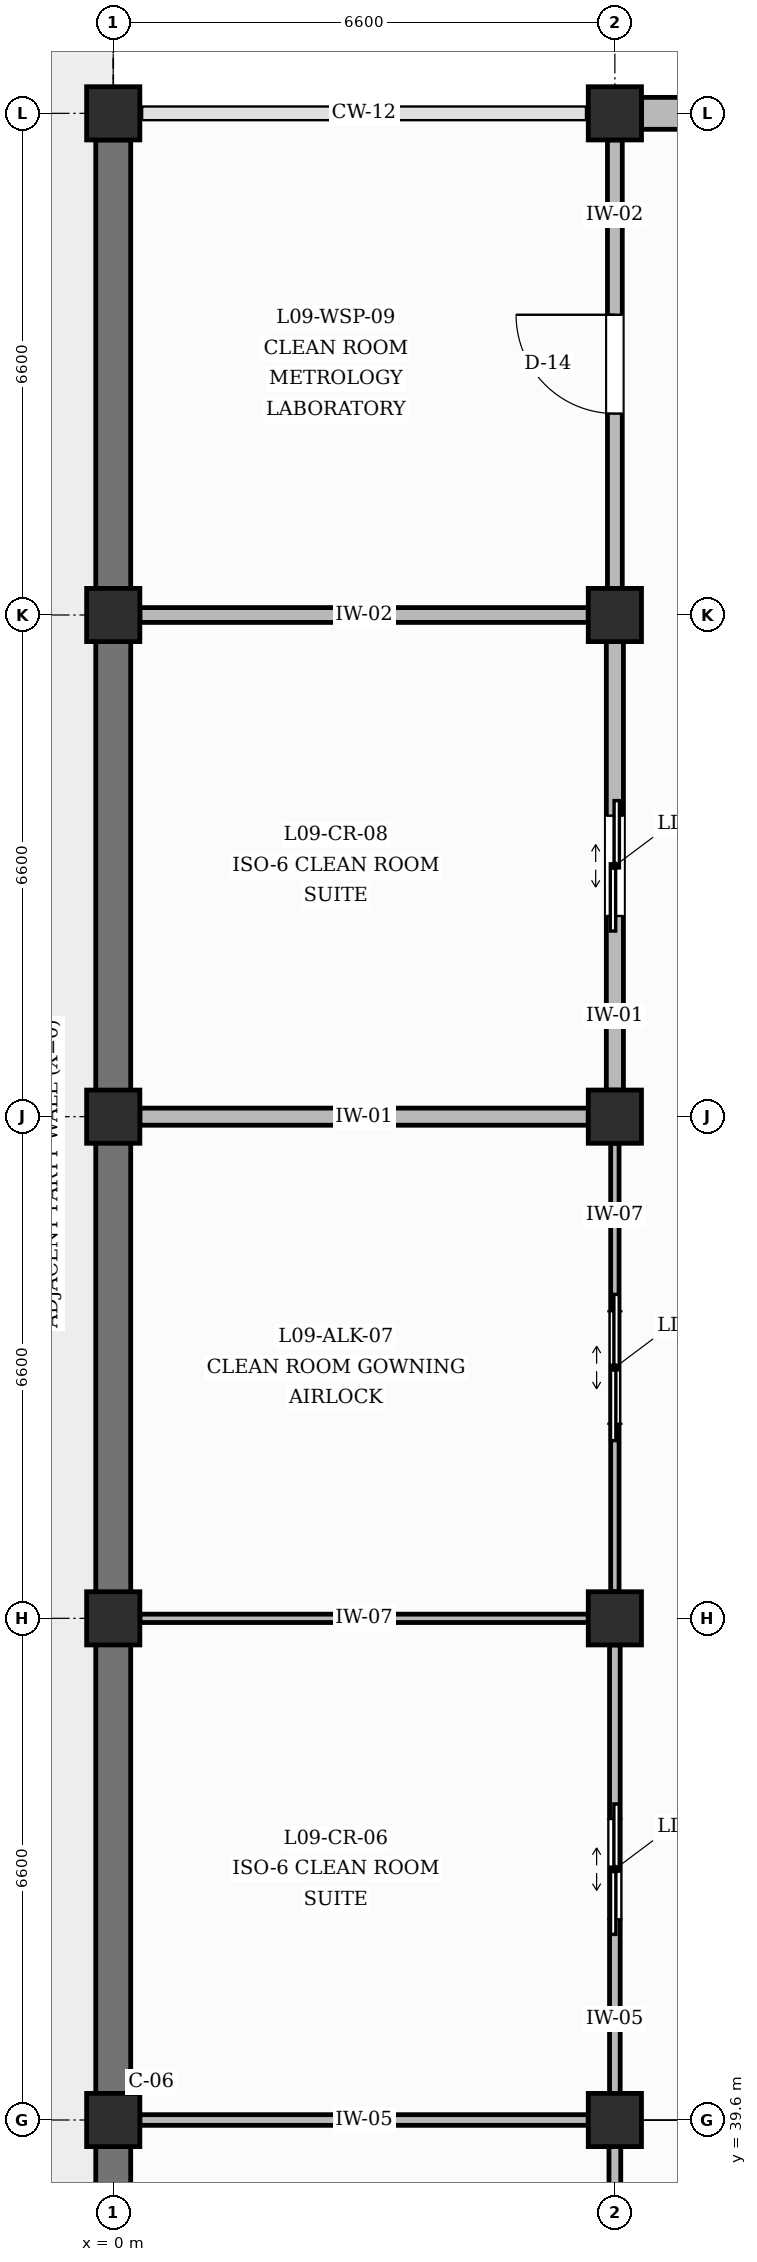
"""IFC4 building model, lengths in metres.
Left out: names, types, materials, properties, quantities, classifications, styles, units other than length and angle.
Written with IfcOpenShell. Run it as: python <this file> out.ifc"""

import sys

from ifc_helpers import new_model, si_unit, direction, frame, frame_2d, origin, origin_2d, place, context, subcontext, project, spatial, rectangle, extrude, element, fill, save


model = new_model("IFC4")
c1 = context("Model", 3, precision=1e-05, world=origin(), true_north=direction((0.0, 1.0)))
c2 = subcontext(c1, "Body", "Model", "MODEL_VIEW")
j1 = project(units=[si_unit("LENGTHUNIT", "METRE"), si_unit("PLANEANGLEUNIT", "RADIAN")], contexts=[c1])
p1 = place(None, origin())
s1 = spatial("IfcSite", under=j1, at=p1, CompositionType="ELEMENT")
p2 = place(p1, origin())
s2 = spatial("IfcBuilding", under=s1, at=p2, CompositionType="ELEMENT")
p3 = place(p2, frame((0.0, 0.0, 39.6)))
s3 = spatial("IfcBuildingStorey", under=s2, at=p3, CompositionType="ELEMENT", Elevation=39.6)
for number, where, z_axis, x_axis in (
    (1, (0.0, 39.6, 0.0), (0.0, 0.0, 1.0), (1.0, 0.0, 0.0)),
    (2, (0.0, 46.2, 0.0), (0.0, 0.0, 1.0), (1.0, 0.0, 0.0)),
    (3, (0.0, 52.8, 0.0), (0.0, 0.0, 1.0), (1.0, 0.0, 0.0)),
    (4, (0.0, 59.4, 0.0), (0.0, 0.0, 1.0), (1.0, 0.0, 0.0)),
    (5, (0.0, 66.0, 0.0), (0.0, 0.0, 1.0), (1.0, 0.0, 0.0)),
    (6, (6.6, 39.6, 0.0), (0.0, 0.0, 1.0), (1.0, 0.0, 0.0)),
    (7, (6.6, 46.2, 0.0), (0.0, 0.0, 1.0), (1.0, 0.0, 0.0)),
    (8, (6.6, 52.8, 0.0), (0.0, 0.0, 1.0), (1.0, 0.0, 0.0)),
    (9, (6.6, 59.4, 0.0), (0.0, 0.0, 1.0), (1.0, 0.0, 0.0)),
    (10, (6.6, 66.0, 0.0), (0.0, 0.0, 1.0), (1.0, 0.0, 0.0)),
):
    element("IfcColumn", number, at=place(p3, frame(where, z_axis=z_axis, x_axis=x_axis)), inside=s3, PredefinedType="COLUMN", context=c2, shape_type="SweptSolid", body=[
        extrude(rectangle(XDim=0.7, YDim=0.7, at=origin_2d()), origin(), (0.0, 0.0, 1.0), 4.2),
    ])
p4 = place(p3, frame((0.0, 33.35, 0.0), z_axis=(0.0, 0.0, 1.0), x_axis=(0.0, 1.0, 0.0)))
e11 = element("IfcWall", 11, at=p4, inside=s3, PredefinedType="SOLIDWALL", context=c2, shape_type="SweptSolid", body=[
    extrude(rectangle(XDim=5.9, YDim=0.46, at=frame_2d((2.95, 0.0))), origin(), (0.0, 0.0, 1.0), 3.29),
])
p5 = place(p3, frame((0.0, 39.95, 0.0), z_axis=(0.0, 0.0, 1.0), x_axis=(0.0, 1.0, 0.0)))
e12 = element("IfcWall", 12, at=p5, inside=s3, PredefinedType="SOLIDWALL", context=c2, shape_type="SweptSolid", body=[
    extrude(rectangle(XDim=5.9, YDim=0.46, at=frame_2d((2.95, 0.0))), origin(), (0.0, 0.0, 1.0), 3.29),
])
p6 = place(p3, frame((0.0, 46.55, 0.0), z_axis=(0.0, 0.0, 1.0), x_axis=(0.0, 1.0, 0.0)))
e13 = element("IfcWall", 13, at=p6, inside=s3, PredefinedType="SOLIDWALL", context=c2, shape_type="SweptSolid", body=[
    extrude(rectangle(XDim=5.9, YDim=0.46, at=frame_2d((2.95, 0.0))), origin(), (0.0, 0.0, 1.0), 3.29),
])
p7 = place(p3, frame((0.0, 53.15, 0.0), z_axis=(0.0, 0.0, 1.0), x_axis=(0.0, 1.0, 0.0)))
e14 = element("IfcWall", 14, at=p7, inside=s3, PredefinedType="SOLIDWALL", context=c2, shape_type="SweptSolid", body=[
    extrude(rectangle(XDim=5.9, YDim=0.46, at=frame_2d((2.95, 0.0))), origin(), (0.0, 0.0, 1.0), 3.29),
])
p8 = place(p3, frame((0.0, 59.75, 0.0), z_axis=(0.0, 0.0, 1.0), x_axis=(0.0, 1.0, 0.0)))
e15 = element("IfcWall", 15, at=p8, inside=s3, PredefinedType="SOLIDWALL", context=c2, shape_type="SweptSolid", body=[
    extrude(rectangle(XDim=5.9, YDim=0.46, at=frame_2d((2.95, 0.0))), origin(), (0.0, 0.0, 1.0), 3.29),
])
p9 = place(p3, frame((6.95, 66.0, 0.0), z_axis=(0.0, 0.0, 1.0), x_axis=(1.0, 0.0, 0.0)))
e16 = element("IfcWall", 16, at=p9, inside=s3, PredefinedType="SOLIDWALL", context=c2, shape_type="SweptSolid", body=[
    extrude(rectangle(XDim=5.9, YDim=0.42, at=frame_2d((2.95, 0.0))), origin(), (0.0, 0.0, 1.0), 3.29),
])
p10 = place(p9, frame((0.8, 0.0, 0.95)))
e17 = element("IfcOpeningElement", 17, at=p10, cuts=e16, PredefinedType="OPENING", context=c2, shape_type="SweptSolid", body=[
    extrude(rectangle(XDim=1.34, YDim=1.52, at=frame_2d((0.67, 0.76))), frame((0.0, 0.22, 0.0), z_axis=(0.0, -1.0, 0.0), x_axis=(1.0, 0.0, 0.0)), (0.0, 0.0, 1.0), 0.44),
])
p11 = place(p9, frame((3.76, 0.0, 0.95)))
e18 = element("IfcOpeningElement", 18, at=p11, cuts=e16, PredefinedType="OPENING", context=c2, shape_type="SweptSolid", body=[
    extrude(rectangle(XDim=1.34, YDim=1.52, at=frame_2d((0.67, 0.76))), frame((0.0, 0.22, 0.0), z_axis=(0.0, -1.0, 0.0), x_axis=(1.0, 0.0, 0.0)), (0.0, 0.0, 1.0), 0.44),
])
p12 = place(p3, frame((6.6, 33.35, 0.0), z_axis=(0.0, 0.0, 1.0), x_axis=(0.0, 1.0, 0.0)))
e19 = element("IfcWall", 19, at=p12, inside=s3, PredefinedType="PARTITIONING", context=c2, shape_type="SweptSolid", body=[
    extrude(rectangle(XDim=5.9, YDim=0.155, at=frame_2d((2.95, 0.0))), origin(), (0.0, 0.0, 1.0), 3.29),
])
p13 = place(p12, frame((2.21, 0.0, 0.0)))
e20 = element("IfcOpeningElement", 20, at=p13, cuts=e19, PredefinedType="OPENING", context=c2, shape_type="SweptSolid", body=[
    extrude(rectangle(XDim=1.48, YDim=2.25, at=frame_2d((0.74, 1.125))), frame((0.0, 0.087, 0.0), z_axis=(0.0, -1.0, 0.0), x_axis=(1.0, 0.0, 0.0)), (0.0, 0.0, 1.0), 0.175),
])
p14 = place(p3, frame((0.35, 39.6, 0.0), z_axis=(0.0, 0.0, 1.0), x_axis=(1.0, 0.0, 0.0)))
e21 = element("IfcWall", 21, at=p14, inside=s3, PredefinedType="PARTITIONING", context=c2, shape_type="SweptSolid", body=[
    extrude(rectangle(XDim=5.9, YDim=0.14, at=frame_2d((2.95, 0.0))), origin(), (0.0, 0.0, 1.0), 3.29),
])
p15 = place(p3, frame((6.6, 39.95, 0.0), z_axis=(0.0, 0.0, 1.0), x_axis=(0.0, 1.0, 0.0)))
e22 = element("IfcWall", 22, at=p15, inside=s3, PredefinedType="PARTITIONING", context=c2, shape_type="SweptSolid", body=[
    extrude(rectangle(XDim=5.9, YDim=0.14, at=frame_2d((2.95, 0.0))), origin(), (0.0, 0.0, 1.0), 3.29),
])
p16 = place(p15, frame((2.29, 0.0, 0.0)))
e23 = element("IfcOpeningElement", 23, at=p16, cuts=e22, PredefinedType="OPENING", context=c2, shape_type="SweptSolid", body=[
    extrude(rectangle(XDim=1.32, YDim=2.2, at=frame_2d((0.66, 1.1))), frame((0.0, 0.08, 0.0), z_axis=(0.0, -1.0, 0.0), x_axis=(1.0, 0.0, 0.0)), (0.0, 0.0, 1.0), 0.16),
])
p17 = place(p3, frame((0.35, 46.2, 0.0), z_axis=(0.0, 0.0, 1.0), x_axis=(1.0, 0.0, 0.0)))
e24 = element("IfcWall", 24, at=p17, inside=s3, PredefinedType="PARTITIONING", context=c2, shape_type="SweptSolid", body=[
    extrude(rectangle(XDim=5.9, YDim=0.11, at=frame_2d((2.95, 0.0))), origin(), (0.0, 0.0, 1.0), 3.29),
])
p18 = place(p3, frame((6.6, 46.55, 0.0), z_axis=(0.0, 0.0, 1.0), x_axis=(0.0, 1.0, 0.0)))
e25 = element("IfcWall", 25, at=p18, inside=s3, PredefinedType="PARTITIONING", context=c2, shape_type="SweptSolid", body=[
    extrude(rectangle(XDim=5.9, YDim=0.11, at=frame_2d((2.95, 0.0))), origin(), (0.0, 0.0, 1.0), 3.29),
])
p19 = place(p18, frame((2.21, 0.0, 0.0)))
e26 = element("IfcOpeningElement", 26, at=p19, cuts=e25, PredefinedType="OPENING", context=c2, shape_type="SweptSolid", body=[
    extrude(rectangle(XDim=1.48, YDim=2.25, at=frame_2d((0.74, 1.125))), frame((0.0, 0.065, 0.0), z_axis=(0.0, -1.0, 0.0), x_axis=(1.0, 0.0, 0.0)), (0.0, 0.0, 1.0), 0.13),
])
p20 = place(p3, frame((0.35, 52.8, 0.0), z_axis=(0.0, 0.0, 1.0), x_axis=(1.0, 0.0, 0.0)))
e27 = element("IfcWall", 27, at=p20, inside=s3, PredefinedType="PARTITIONING", context=c2, shape_type="SweptSolid", body=[
    extrude(rectangle(XDim=5.9, YDim=0.225, at=frame_2d((2.95, 0.0))), origin(), (0.0, 0.0, 1.0), 3.29),
])
p21 = place(p3, frame((6.6, 53.15, 0.0), z_axis=(0.0, 0.0, 1.0), x_axis=(0.0, 1.0, 0.0)))
e28 = element("IfcWall", 28, at=p21, inside=s3, PredefinedType="PARTITIONING", context=c2, shape_type="SweptSolid", body=[
    extrude(rectangle(XDim=5.9, YDim=0.225, at=frame_2d((2.95, 0.0))), origin(), (0.0, 0.0, 1.0), 3.29),
])
p22 = place(p21, frame((2.29, 0.0, 0.0)))
e29 = element("IfcOpeningElement", 29, at=p22, cuts=e28, PredefinedType="OPENING", context=c2, shape_type="SweptSolid", body=[
    extrude(rectangle(XDim=1.32, YDim=2.2, at=frame_2d((0.66, 1.1))), frame((0.0, 0.123, 0.0), z_axis=(0.0, -1.0, 0.0), x_axis=(1.0, 0.0, 0.0)), (0.0, 0.0, 1.0), 0.245),
])
p23 = place(p3, frame((0.35, 59.4, 0.0), z_axis=(0.0, 0.0, 1.0), x_axis=(1.0, 0.0, 0.0)))
e30 = element("IfcWall", 30, at=p23, inside=s3, PredefinedType="PARTITIONING", context=c2, shape_type="SweptSolid", body=[
    extrude(rectangle(XDim=5.9, YDim=0.195, at=frame_2d((2.95, 0.0))), origin(), (0.0, 0.0, 1.0), 3.29),
])
p24 = place(p3, frame((6.6, 59.75, 0.0), z_axis=(0.0, 0.0, 1.0), x_axis=(0.0, 1.0, 0.0)))
e31 = element("IfcWall", 31, at=p24, inside=s3, PredefinedType="PARTITIONING", context=c2, shape_type="SweptSolid", body=[
    extrude(rectangle(XDim=5.9, YDim=0.195, at=frame_2d((2.95, 0.0))), origin(), (0.0, 0.0, 1.0), 3.29),
])
p25 = place(p24, frame((2.3, 0.0, 0.0)))
e32 = element("IfcOpeningElement", 32, at=p25, cuts=e31, PredefinedType="OPENING", context=c2, shape_type="SweptSolid", body=[
    extrude(rectangle(XDim=1.3, YDim=2.3, at=frame_2d((0.65, 1.15))), frame((0.0, 0.107, 0.0), z_axis=(0.0, -1.0, 0.0), x_axis=(1.0, 0.0, 0.0)), (0.0, 0.0, 1.0), 0.215),
])
p26 = place(p16, origin())
e33 = element("IfcDoor", 33, at=p26, inside=s3, OperationType="DOUBLE_DOOR_SLIDING", PredefinedType="USERDEFINED", context=c2, shape_type="SweptSolid", body=[
    extrude(rectangle(XDim=1.32, YDim=2.2, at=frame_2d((0.66, 1.1))), frame((0.0, 0.025, 0.0), z_axis=(0.0, -1.0, 0.0), x_axis=(1.0, 0.0, 0.0)), (0.0, 0.0, 1.0), 0.05),
])
fill(e23, e33)
p27 = place(p19, origin())
e34 = element("IfcDoor", 34, at=p27, inside=s3, OperationType="DOUBLE_DOOR_SLIDING", PredefinedType="USERDEFINED", context=c2, shape_type="SweptSolid", body=[
    extrude(rectangle(XDim=1.48, YDim=2.25, at=frame_2d((0.74, 1.125))), frame((0.0, 0.025, 0.0), z_axis=(0.0, -1.0, 0.0), x_axis=(1.0, 0.0, 0.0)), (0.0, 0.0, 1.0), 0.05),
])
fill(e26, e34)
p28 = place(p22, origin())
e35 = element("IfcDoor", 35, at=p28, inside=s3, OperationType="DOUBLE_DOOR_SLIDING", PredefinedType="USERDEFINED", context=c2, shape_type="SweptSolid", body=[
    extrude(rectangle(XDim=1.32, YDim=2.2, at=frame_2d((0.66, 1.1))), frame((0.0, 0.025, 0.0), z_axis=(0.0, -1.0, 0.0), x_axis=(1.0, 0.0, 0.0)), (0.0, 0.0, 1.0), 0.05),
])
fill(e29, e35)
p29 = place(p25, origin())
e36 = element("IfcDoor", 36, at=p29, inside=s3, OperationType="SINGLE_SWING_RIGHT", PredefinedType="DOOR", context=c2, shape_type="SweptSolid", body=[
    extrude(rectangle(XDim=1.3, YDim=2.3, at=frame_2d((0.65, 1.15))), frame((0.0, 0.025, 0.0), z_axis=(0.0, -1.0, 0.0), x_axis=(1.0, 0.0, 0.0)), (0.0, 0.0, 1.0), 0.05),
])
fill(e32, e36)
save(model, sys.argv[1])
